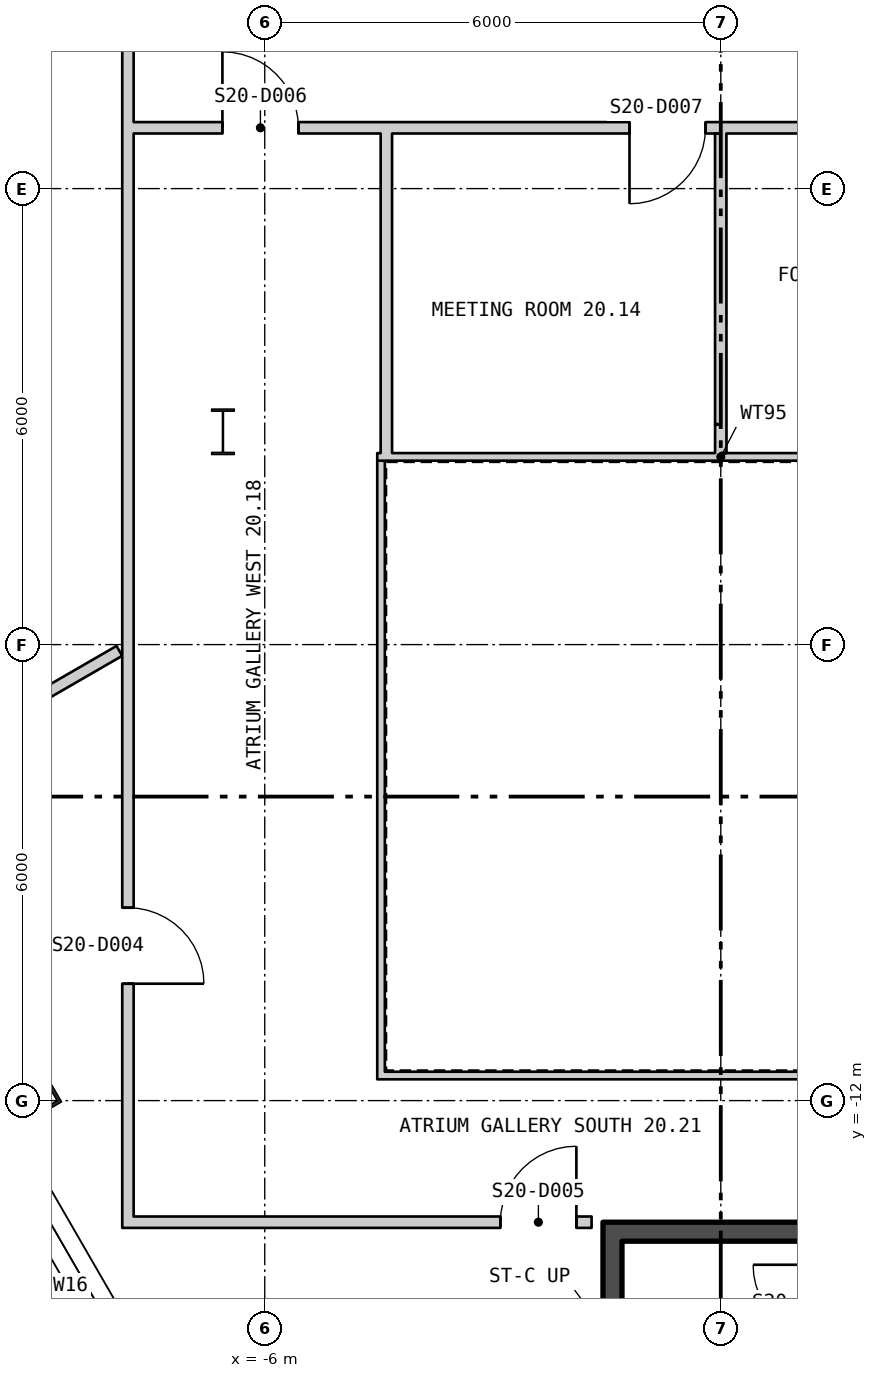
"""IFC4 building model, lengths in metres.
Left out: names, types, materials, properties, quantities, classifications, styles, units other than length and angle.
Written with IfcOpenShell. Run it as: python <this file> out.ifc"""

import sys

from ifc_helpers import new_model, si_unit, direction, frame, frame_2d, origin, origin_2d, place, context, subcontext, project, spatial, polyline, rectangle, hollow_rectangle, i_section, outline, extrude, element, fill, save


model = new_model("IFC4")
c1 = context("Model", 3, precision=1e-05, world=origin(), true_north=direction((0.0, 1.0)))
c2 = subcontext(c1, "Body", "Model", "MODEL_VIEW")
j1 = project(units=[si_unit("LENGTHUNIT", "METRE"), si_unit("PLANEANGLEUNIT", "RADIAN")], contexts=[c1])
p1 = place(None, origin())
s1 = spatial("IfcSite", under=j1, at=p1, CompositionType="ELEMENT")
p2 = place(p1, origin())
s2 = spatial("IfcBuilding", under=s1, at=p2, CompositionType="ELEMENT")
p3 = place(p2, frame((0.0, 0.0, 268.8)))
s3 = spatial("IfcBuildingStorey", under=s2, at=p3, CompositionType="ELEMENT", Elevation=268.8)
p4 = place(p3, frame((-9.1, -11.976, 0.0), z_axis=(0.0, 0.0, 1.0), x_axis=(0.5, -0.866025403784, 0.0)))
e1 = element("IfcColumn", 1, at=p4, inside=s3, PredefinedType="COLUMN", context=c2, shape_type="SweptSolid", body=[
    extrude(hollow_rectangle(XDim=0.5, YDim=0.7, WallThickness=0.045, at=origin_2d()), origin(), (0.0, 0.0, 1.0), 3.9),
])
p5 = place(p3, frame((-6.55, -3.2, 0.0), z_axis=(0.0, 0.0, 1.0), x_axis=(1.0, 0.0, 0.0)))
e2 = element("IfcColumn", 2, at=p5, inside=s3, PredefinedType="COLUMN", context=c2, shape_type="SweptSolid", body=[
    extrude(i_section(OverallWidth=0.3, OverallDepth=0.6, WebThickness=0.015, FlangeThickness=0.03, at=origin_2d()), origin(), (0.0, 0.0, 1.0), 3.9),
])
p6 = place(p3, frame((-25.54, 15.35, -0.18), z_axis=(0.0, 0.0, 1.0), x_axis=(0.499999764979, -0.866025539474, 0.0)))
e3 = element("IfcWall", 3, at=p6, inside=s3, PredefinedType="SOLIDWALL", context=c2, shape_type="SweptSolid", body=[
    extrude(outline(polyline([(-0.13, -0.225), (45.87, -0.225), (45.61, 0.225), (0.13, 0.225), (-0.13, -0.225)])), origin(), (0.0, 0.0, 1.0), 3.68),
])
p7 = place(p6, frame((1.424, 0.0, 1.08)))
e4 = element("IfcOpeningElement", 4, at=p7, cuts=e3, PredefinedType="OPENING", context=c2, shape_type="SweptSolid", body=[
    extrude(rectangle(XDim=2.4, YDim=2.0, at=frame_2d((1.2, 1.0))), frame((0.0, 0.235, 0.0), z_axis=(0.0, -1.0, 0.0), x_axis=(1.0, 0.0, 0.0)), (0.0, 0.0, 1.0), 0.47),
])
p8 = place(p6, frame((5.893, 0.0, 1.08)))
e5 = element("IfcOpeningElement", 5, at=p8, cuts=e3, PredefinedType="OPENING", context=c2, shape_type="SweptSolid", body=[
    extrude(rectangle(XDim=2.4, YDim=2.0, at=frame_2d((1.2, 1.0))), frame((0.0, 0.235, 0.0), z_axis=(0.0, -1.0, 0.0), x_axis=(1.0, 0.0, 0.0)), (0.0, 0.0, 1.0), 0.47),
])
p9 = place(p6, frame((10.401, 0.0, 1.08)))
e6 = element("IfcOpeningElement", 6, at=p9, cuts=e3, PredefinedType="OPENING", context=c2, shape_type="SweptSolid", body=[
    extrude(rectangle(XDim=2.4, YDim=2.0, at=frame_2d((1.2, 1.0))), frame((0.0, 0.235, 0.0), z_axis=(0.0, -1.0, 0.0), x_axis=(1.0, 0.0, 0.0)), (0.0, 0.0, 1.0), 0.47),
])
p10 = place(p6, frame((14.909, 0.0, 1.08)))
e7 = element("IfcOpeningElement", 7, at=p10, cuts=e3, PredefinedType="OPENING", context=c2, shape_type="SweptSolid", body=[
    extrude(rectangle(XDim=2.4, YDim=2.0, at=frame_2d((1.2, 1.0))), frame((0.0, 0.235, 0.0), z_axis=(0.0, -1.0, 0.0), x_axis=(1.0, 0.0, 0.0)), (0.0, 0.0, 1.0), 0.47),
])
p11 = place(p6, frame((19.416, 0.0, 1.08)))
e8 = element("IfcOpeningElement", 8, at=p11, cuts=e3, PredefinedType="OPENING", context=c2, shape_type="SweptSolid", body=[
    extrude(rectangle(XDim=2.4, YDim=2.0, at=frame_2d((1.2, 1.0))), frame((0.0, 0.235, 0.0), z_axis=(0.0, -1.0, 0.0), x_axis=(1.0, 0.0, 0.0)), (0.0, 0.0, 1.0), 0.47),
])
p12 = place(p6, frame((23.924, 0.0, 1.08)))
e9 = element("IfcOpeningElement", 9, at=p12, cuts=e3, PredefinedType="OPENING", context=c2, shape_type="SweptSolid", body=[
    extrude(rectangle(XDim=2.4, YDim=2.0, at=frame_2d((1.2, 1.0))), frame((0.0, 0.235, 0.0), z_axis=(0.0, -1.0, 0.0), x_axis=(1.0, 0.0, 0.0)), (0.0, 0.0, 1.0), 0.47),
])
p13 = place(p6, frame((28.431, 0.0, 1.08)))
e10 = element("IfcOpeningElement", 10, at=p13, cuts=e3, PredefinedType="OPENING", context=c2, shape_type="SweptSolid", body=[
    extrude(rectangle(XDim=2.4, YDim=2.0, at=frame_2d((1.2, 1.0))), frame((0.0, 0.235, 0.0), z_axis=(0.0, -1.0, 0.0), x_axis=(1.0, 0.0, 0.0)), (0.0, 0.0, 1.0), 0.47),
])
p14 = place(p6, frame((32.939, 0.0, 1.08)))
e11 = element("IfcOpeningElement", 11, at=p14, cuts=e3, PredefinedType="OPENING", context=c2, shape_type="SweptSolid", body=[
    extrude(rectangle(XDim=2.4, YDim=2.0, at=frame_2d((1.2, 1.0))), frame((0.0, 0.235, 0.0), z_axis=(0.0, -1.0, 0.0), x_axis=(1.0, 0.0, 0.0)), (0.0, 0.0, 1.0), 0.47),
])
p15 = place(p6, frame((37.447, 0.0, 1.08)))
e12 = element("IfcOpeningElement", 12, at=p15, cuts=e3, PredefinedType="OPENING", context=c2, shape_type="SweptSolid", body=[
    extrude(rectangle(XDim=2.4, YDim=2.0, at=frame_2d((1.2, 1.0))), frame((0.0, 0.235, 0.0), z_axis=(0.0, -1.0, 0.0), x_axis=(1.0, 0.0, 0.0)), (0.0, 0.0, 1.0), 0.47),
])
p16 = place(p6, frame((41.916, 0.0, 1.08)))
e13 = element("IfcOpeningElement", 13, at=p16, cuts=e3, PredefinedType="OPENING", context=c2, shape_type="SweptSolid", body=[
    extrude(rectangle(XDim=2.4, YDim=2.0, at=frame_2d((1.2, 1.0))), frame((0.0, 0.235, 0.0), z_axis=(0.0, -1.0, 0.0), x_axis=(1.0, 0.0, 0.0)), (0.0, 0.0, 1.0), 0.47),
])
for number, where, z_axis, x_axis in (
    (14, (-4.52, -11.67, 0.0), (0.0, 0.0, 1.0), (1.0, 0.0, 0.0)),
    (15, (4.52, -3.53, 0.0), (0.0, 0.0, 1.0), (-1.0, 0.0, 0.0)),
):
    element("IfcWall", number, at=place(p3, frame(where, z_axis=z_axis, x_axis=x_axis)), inside=s3, PredefinedType="PARTITIONING", context=c2, shape_type="SweptSolid", body=[
        extrude(rectangle(XDim=9.04, YDim=0.1, at=frame_2d((4.52, 0.0))), origin(), (0.0, 0.0, 1.0), 3.7),
    ])
p17 = place(p3, frame((-4.47, -3.58, 0.0), z_axis=(0.0, 0.0, 1.0), x_axis=(0.0, -1.0, 0.0)))
e16 = element("IfcWall", 16, at=p17, inside=s3, PredefinedType="PARTITIONING", context=c2, shape_type="SweptSolid", body=[
    extrude(rectangle(XDim=8.04, YDim=0.1, at=frame_2d((4.02, 0.0))), origin(), (0.0, 0.0, 1.0), 3.7),
])
p18 = place(p3, frame((-1.425, -21.05, 0.0), z_axis=(0.0, 0.0, 1.0), x_axis=(0.0, 1.0, 0.0)))
e17 = element("IfcWall", 17, at=p18, inside=s3, PredefinedType="SHEAR", context=c2, shape_type="SweptSolid", body=[
    extrude(rectangle(XDim=7.2, YDim=0.25, at=frame_2d((3.6, 0.0))), origin(), (0.0, 0.0, 1.0), 3.7),
])
p19 = place(p3, frame((-1.55, -13.725, 0.0), z_axis=(0.0, 0.0, 1.0), x_axis=(1.0, 0.0, 0.0)))
e18 = element("IfcWall", 18, at=p19, inside=s3, PredefinedType="SHEAR", context=c2, shape_type="SweptSolid", body=[
    extrude(rectangle(XDim=3.1, YDim=0.25, at=frame_2d((1.55, 0.0))), origin(), (0.0, 0.0, 1.0), 3.7),
])
p20 = place(p3, frame((-11.267, -8.021, 0.0), z_axis=(0.0, 0.0, 1.0), x_axis=(0.865850162789, 0.500303403544, 0.0)))
e19 = element("IfcWall", 19, at=p20, inside=s3, PredefinedType="PARTITIONING", context=c2, shape_type="SweptSolid", body=[
    extrude(rectangle(XDim=3.874, YDim=0.15, at=frame_2d((1.937, 0.0))), origin(), (0.0, 0.0, 1.0), 3.7),
])
p21 = place(p3, frame((-7.8, -13.675, 0.0), z_axis=(0.0, 0.0, 1.0), x_axis=(0.0, 1.0, 0.0)))
e20 = element("IfcWall", 20, at=p21, inside=s3, PredefinedType="PARTITIONING", context=c2, shape_type="SweptSolid", body=[
    extrude(rectangle(XDim=15.872, YDim=0.15, at=frame_2d((7.936, 0.0))), origin(), (0.0, 0.0, 1.0), 3.7),
])
p22 = place(p21, frame((3.213, 0.0, 0.0)))
e21 = element("IfcOpeningElement", 21, at=p22, cuts=e20, PredefinedType="OPENING", context=c2, shape_type="SweptSolid", body=[
    extrude(rectangle(XDim=1.0, YDim=2.1, at=frame_2d((0.5, 1.05))), frame((0.0, 0.085, 0.0), z_axis=(0.0, -1.0, 0.0), x_axis=(1.0, 0.0, 0.0)), (0.0, 0.0, 1.0), 0.17),
])
p23 = place(p3, frame((-7.725, -13.6, 0.0), z_axis=(0.0, 0.0, 1.0), x_axis=(1.0, 0.0, 0.0)))
e22 = element("IfcWall", 22, at=p23, inside=s3, PredefinedType="PARTITIONING", context=c2, shape_type="SweptSolid", body=[
    extrude(rectangle(XDim=6.025, YDim=0.15, at=frame_2d((3.013, 0.0))), origin(), (0.0, 0.0, 1.0), 2.79),
])
p24 = place(p23, frame((4.825, 0.0, 0.0)))
e23 = element("IfcOpeningElement", 23, at=p24, cuts=e22, PredefinedType="OPENING", context=c2, shape_type="SweptSolid", body=[
    extrude(rectangle(XDim=1.0, YDim=2.1, at=frame_2d((0.5, 1.05))), frame((0.0, 0.085, 0.0), z_axis=(0.0, -1.0, 0.0), x_axis=(1.0, 0.0, 0.0)), (0.0, 0.0, 1.0), 0.17),
])
p25 = place(p3, frame((-7.725, 0.8, 0.0), z_axis=(0.0, 0.0, 1.0), x_axis=(1.0, 0.0, 0.0)))
e24 = element("IfcWall", 24, at=p25, inside=s3, PredefinedType="PARTITIONING", context=c2, shape_type="SweptSolid", body=[
    extrude(rectangle(XDim=15.45, YDim=0.15, at=frame_2d((7.725, 0.0))), origin(), (0.0, 0.0, 1.0), 3.7),
])
p26 = place(p25, frame((1.168, 0.0, 0.0)))
e25 = element("IfcOpeningElement", 25, at=p26, cuts=e24, PredefinedType="OPENING", context=c2, shape_type="SweptSolid", body=[
    extrude(rectangle(XDim=1.0, YDim=2.1, at=frame_2d((0.5, 1.05))), frame((0.0, 0.085, 0.0), z_axis=(0.0, -1.0, 0.0), x_axis=(1.0, 0.0, 0.0)), (0.0, 0.0, 1.0), 0.17),
])
p27 = place(p25, frame((6.524, 0.0, 0.0)))
e26 = element("IfcOpeningElement", 26, at=p27, cuts=e24, PredefinedType="OPENING", context=c2, shape_type="SweptSolid", body=[
    extrude(rectangle(XDim=1.0, YDim=2.1, at=frame_2d((0.5, 1.05))), frame((0.0, 0.085, 0.0), z_axis=(0.0, -1.0, 0.0), x_axis=(1.0, 0.0, 0.0)), (0.0, 0.0, 1.0), 0.17),
])
p28 = place(p25, frame((13.281, 0.0, 0.0)))
e27 = element("IfcOpeningElement", 27, at=p28, cuts=e24, PredefinedType="OPENING", context=c2, shape_type="SweptSolid", body=[
    extrude(rectangle(XDim=1.0, YDim=2.1, at=frame_2d((0.5, 1.05))), frame((0.0, 0.085, 0.0), z_axis=(0.0, -1.0, 0.0), x_axis=(1.0, 0.0, 0.0)), (0.0, 0.0, 1.0), 0.17),
])
p29 = place(p3, frame((-4.4, -3.48, 0.0), z_axis=(0.0, 0.0, 1.0), x_axis=(0.0, 1.0, 0.0)))
e28 = element("IfcWall", 28, at=p29, inside=s3, PredefinedType="PARTITIONING", context=c2, shape_type="SweptSolid", body=[
    extrude(rectangle(XDim=4.205, YDim=0.15, at=frame_2d((2.103, 0.0))), origin(), (0.0, 0.0, 1.0), 3.7),
])
p30 = place(p3, frame((-0.001, 0.725, 0.0), z_axis=(0.0, 0.0, 1.0), x_axis=(0.000235294111, -0.999999972318, 0.0)))
e29 = element("IfcWall", 29, at=p30, inside=s3, PredefinedType="PARTITIONING", context=c2, shape_type="SweptSolid", body=[
    extrude(rectangle(XDim=3.825, YDim=0.15, at=frame_2d((1.913, 0.0))), origin(), (0.0, 0.0, 1.0), 3.2),
])
p31 = place(p3, frame((-0.0, -3.1, 0.0), z_axis=(0.0, 0.0, 1.0), x_axis=(0.000263157886, -0.999999965374, 0.0)))
e30 = element("IfcWall", 30, at=p31, inside=s3, PredefinedType="PARTITIONING", context=c2, shape_type="SweptSolid", body=[
    extrude(rectangle(XDim=0.38, YDim=0.15, at=frame_2d((0.19, 0.0))), origin(), (0.0, 0.0, 1.0), 3.7),
])
p32 = place(p14, origin())
e31 = element("IfcWindow", 31, at=p32, inside=s3, PartitioningType="SINGLE_PANEL", PredefinedType="WINDOW", context=c2, shape_type="SweptSolid", body=[
    extrude(rectangle(XDim=2.4, YDim=2.0, at=frame_2d((1.2, 1.0))), frame((0.0, 0.105, 0.0), z_axis=(0.0, -1.0, 0.0), x_axis=(1.0, 0.0, 0.0)), (0.0, 0.0, 1.0), 0.06),
])
fill(e11, e31)
p33 = place(p22, origin())
e32 = element("IfcDoor", 32, at=p33, inside=s3, OperationType="SINGLE_SWING_LEFT", PredefinedType="DOOR", context=c2, shape_type="SweptSolid", body=[
    extrude(rectangle(XDim=1.0, YDim=2.1, at=frame_2d((0.5, 1.05))), frame((0.0, 0.025, 0.0), z_axis=(0.0, -1.0, 0.0), x_axis=(1.0, 0.0, 0.0)), (0.0, 0.0, 1.0), 0.05),
])
fill(e21, e32)
p34 = place(p24, origin())
e33 = element("IfcDoor", 33, at=p34, inside=s3, OperationType="SINGLE_SWING_LEFT", PredefinedType="DOOR", context=c2, shape_type="SweptSolid", body=[
    extrude(rectangle(XDim=1.0, YDim=2.1, at=frame_2d((0.5, 1.05))), frame((0.0, 0.025, 0.0), z_axis=(0.0, -1.0, 0.0), x_axis=(1.0, 0.0, 0.0)), (0.0, 0.0, 1.0), 0.05),
])
fill(e23, e33)
p35 = place(p26, origin())
e34 = element("IfcDoor", 34, at=p35, inside=s3, OperationType="SINGLE_SWING_RIGHT", PredefinedType="DOOR", context=c2, shape_type="SweptSolid", body=[
    extrude(rectangle(XDim=1.0, YDim=2.1, at=frame_2d((0.5, 1.05))), frame((0.0, 0.025, 0.0), z_axis=(0.0, -1.0, 0.0), x_axis=(1.0, 0.0, 0.0)), (0.0, 0.0, 1.0), 0.05),
])
fill(e25, e34)
p36 = place(p27, origin())
e35 = element("IfcDoor", 35, at=p36, inside=s3, OperationType="SINGLE_SWING_LEFT", PredefinedType="DOOR", context=c2, shape_type="SweptSolid", body=[
    extrude(rectangle(XDim=1.0, YDim=2.1, at=frame_2d((0.5, 1.05))), frame((0.0, 0.025, 0.0), z_axis=(0.0, -1.0, 0.0), x_axis=(1.0, 0.0, 0.0)), (0.0, 0.0, 1.0), 0.05),
])
fill(e26, e35)
save(model, sys.argv[1])
